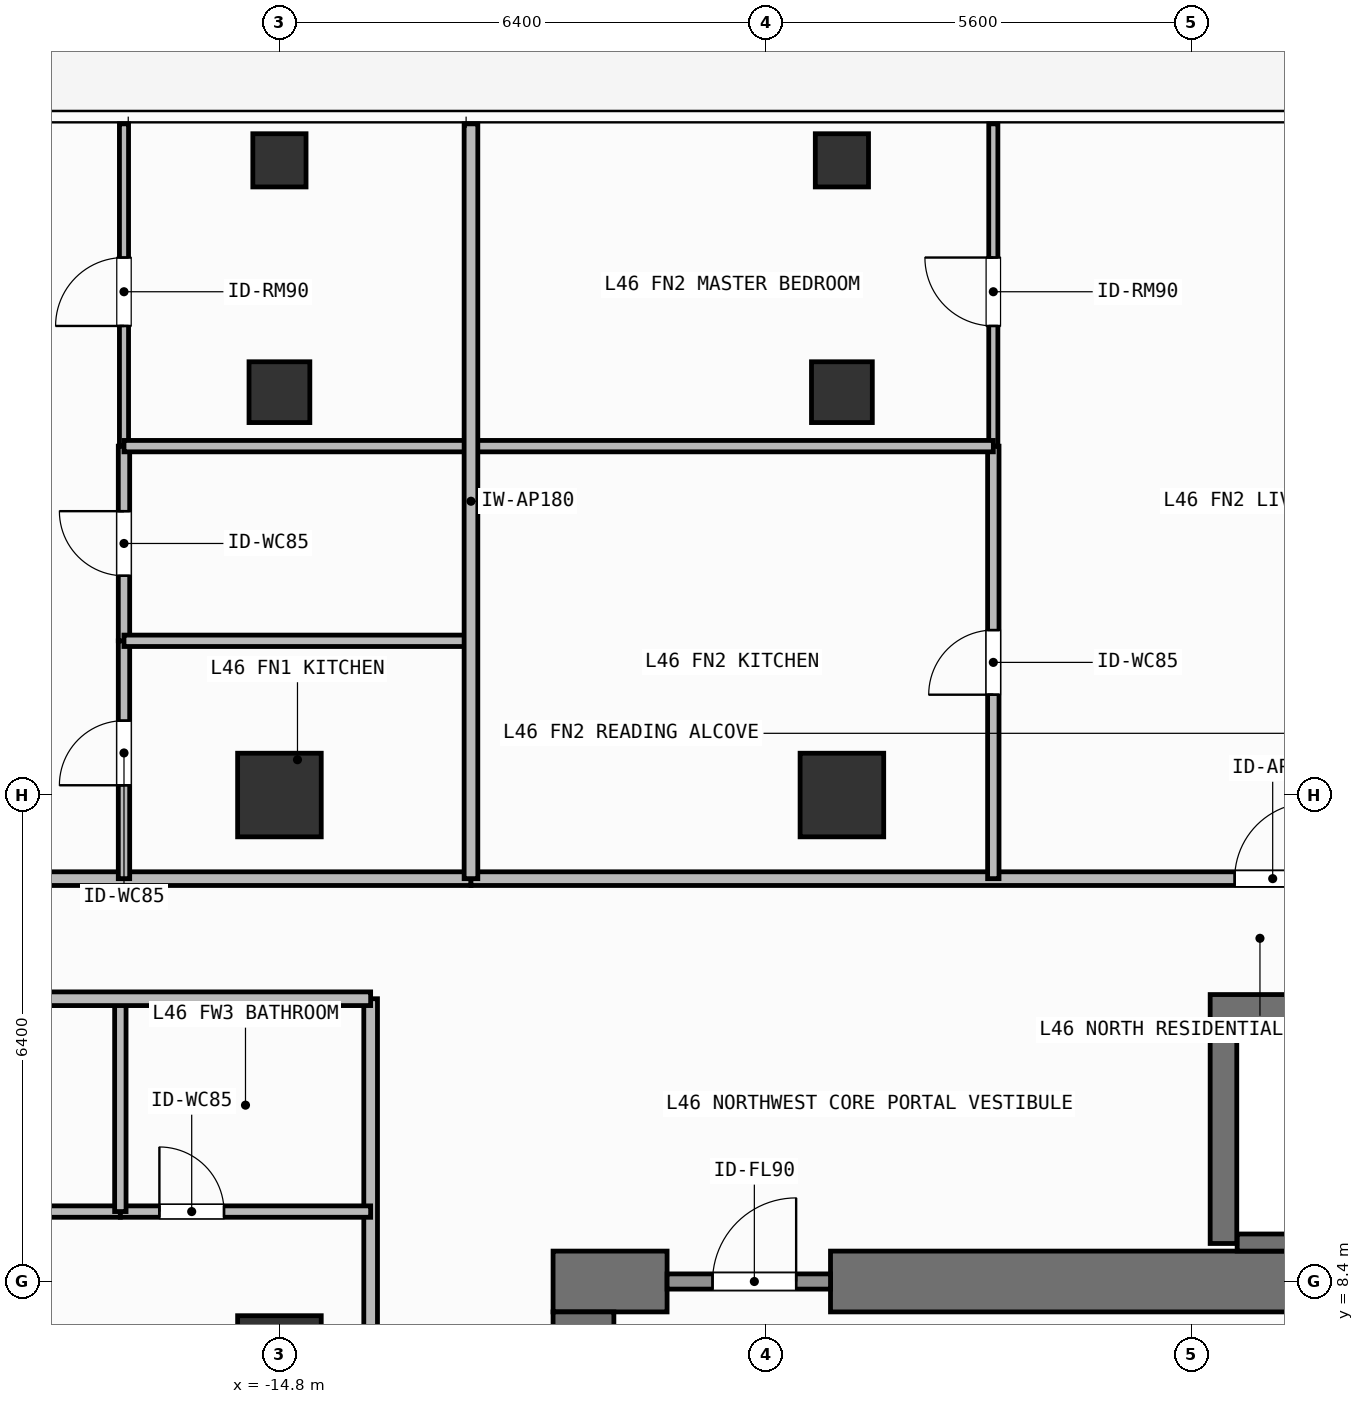
"""IFC4 building model, lengths in metres.
Left out: names, types, materials, properties, quantities, classifications, styles, units other than length and angle.
Written with IfcOpenShell. Run it as: python <this file> out.ifc"""

import sys

from ifc_helpers import new_model, si_unit, direction, frame, frame_2d, origin, origin_2d, place, context, subcontext, project, spatial, rectangle, hollow_rectangle, extrude, element, fill, save


model = new_model("IFC4")
c1 = context("Model", 3, precision=1e-05, world=origin(), true_north=direction((0.0, 1.0)))
c2 = subcontext(c1, "Body", "Model", "MODEL_VIEW")
j1 = project(units=[si_unit("LENGTHUNIT", "METRE"), si_unit("PLANEANGLEUNIT", "RADIAN")], contexts=[c1])
p1 = place(None, origin())
s1 = spatial("IfcSite", under=j1, at=p1, CompositionType="ELEMENT")
p2 = place(p1, origin())
s2 = spatial("IfcBuilding", under=s1, at=p2, CompositionType="ELEMENT")
p3 = place(p2, frame((0.0, 0.0, 187.5)))
s3 = spatial("IfcBuildingStorey", under=s2, at=p3, CompositionType="ELEMENT", Elevation=187.5)
p4 = place(p3, frame((-11.2, 8.4, 0.0), z_axis=(0.0, 0.0, 1.0), x_axis=(1.0, 0.0, 0.0)))
e1 = element("IfcWall", 1, at=p4, inside=s3, PredefinedType="SHEAR", context=c2, shape_type="SweptSolid", body=[
    extrude(rectangle(XDim=1.5, YDim=0.8, at=frame_2d((0.75, 0.0))), origin(), (0.0, 0.0, 1.0), 3.9),
])
p5 = place(p3, frame((-7.55, 8.4, 0.0), z_axis=(0.0, 0.0, 1.0), x_axis=(1.0, 0.0, 0.0)))
e2 = element("IfcWall", 2, at=p5, inside=s3, PredefinedType="SHEAR", context=c2, shape_type="SweptSolid", body=[
    extrude(rectangle(XDim=16.35, YDim=0.8, at=frame_2d((8.175, 0.0))), origin(), (0.0, 0.0, 1.0), 3.9),
])
p6 = place(p3, frame((-10.8, -8.0, 0.0), z_axis=(0.0, 0.0, 1.0), x_axis=(0.0, 1.0, 0.0)))
e3 = element("IfcWall", 3, at=p6, inside=s3, PredefinedType="SHEAR", context=c2, shape_type="SweptSolid", body=[
    extrude(rectangle(XDim=16.0, YDim=0.8, at=frame_2d((8.0, 0.0))), origin(), (0.0, 0.0, 1.0), 3.9),
])
p7 = place(p3, frame((-2.555, 12.0, 0.0), z_axis=(0.0, 0.0, 1.0), x_axis=(1.0, 0.0, 0.0)))
e4 = element("IfcWall", 4, at=p7, inside=s3, PredefinedType="SHEAR", context=c2, shape_type="SweptSolid", body=[
    extrude(rectangle(XDim=7.31, YDim=0.35, at=frame_2d((3.655, 0.0))), origin(), (0.0, 0.0, 1.0), 3.9),
])
p8 = place(p3, frame((-2.2, 8.913, 0.0), z_axis=(0.0, 0.0, 1.0), x_axis=(1.0, 0.0, 0.0)))
e5 = element("IfcWall", 5, at=p8, inside=s3, PredefinedType="SHEAR", context=c2, shape_type="SweptSolid", body=[
    extrude(rectangle(XDim=6.6, YDim=0.225, at=frame_2d((3.3, 0.0))), origin(), (0.0, 0.0, 1.0), 3.9),
])
p9 = place(p3, frame((-2.38, 8.9, 0.0), z_axis=(0.0, 0.0, 1.0), x_axis=(0.0, 1.0, 0.0)))
e6 = element("IfcWall", 6, at=p9, inside=s3, PredefinedType="SHEAR", context=c2, shape_type="SweptSolid", body=[
    extrude(rectangle(XDim=2.925, YDim=0.35, at=frame_2d((1.462, 0.0))), origin(), (0.0, 0.0, 1.0), 3.9),
])
for number, where, z_axis, x_axis in (
    (7, (-14.8, 14.8, 0.0), (0.0, 0.0, 1.0), (1.0, 0.0, 0.0)),
    (8, (-7.4, 14.8, 0.0), (0.0, 0.0, 1.0), (1.0, 0.0, 0.0)),
    (9, (-14.8, 7.4, 0.0), (0.0, 0.0, 1.0), (1.0, 0.0, 0.0)),
):
    element("IfcColumn", number, at=place(p3, frame(where, z_axis=z_axis, x_axis=x_axis)), inside=s3, PredefinedType="COLUMN", context=c2, shape_type="SweptSolid", body=[
        extrude(rectangle(XDim=1.1, YDim=1.1, at=origin_2d()), origin(), (0.0, 0.0, 1.0), 3.9),
    ])
for number, where, z_axis, x_axis in (
    (10, (-14.8, 20.1, 0.0), (0.0, 0.0, 1.0), (1.0, 0.0, 0.0)),
    (11, (-7.4, 20.1, 0.0), (0.0, 0.0, 1.0), (1.0, 0.0, 0.0)),
):
    element("IfcColumn", number, at=place(p3, frame(where, z_axis=z_axis, x_axis=x_axis)), inside=s3, PredefinedType="COLUMN", context=c2, shape_type="SweptSolid", body=[
        extrude(hollow_rectangle(XDim=0.8, YDim=0.8, WallThickness=0.036, at=origin_2d()), origin(), (0.0, 0.0, 1.0), 3.9),
    ])
for number, where, z_axis, x_axis in (
    (12, (-14.8, 23.15, 0.0), (0.0, 0.0, 1.0), (1.0, 0.0, 0.0)),
    (13, (-7.4, 23.15, 0.0), (0.0, 0.0, 1.0), (1.0, 0.0, 0.0)),
):
    element("IfcColumn", number, at=place(p3, frame(where, z_axis=z_axis, x_axis=x_axis)), inside=s3, PredefinedType="COLUMN", context=c2, shape_type="SweptSolid", body=[
        extrude(hollow_rectangle(XDim=0.7, YDim=0.7, WallThickness=0.032, at=origin_2d()), origin(), (0.0, 0.0, 1.0), 3.9),
    ])
p10 = place(p3, frame((-9.7, 8.4, 0.0), z_axis=(0.0, 0.0, 1.0), x_axis=(1.0, 0.0, 0.0)))
e14 = element("IfcWall", 14, at=p10, inside=s3, PredefinedType="SOLIDWALL", context=c2, shape_type="SweptSolid", body=[
    extrude(rectangle(XDim=2.15, YDim=0.2, at=frame_2d((1.075, 0.0))), origin(), (0.0, 0.0, 1.0), 2.76),
])
p11 = place(p10, frame((0.598, 0.0, 0.0)))
e15 = element("IfcOpeningElement", 15, at=p11, cuts=e14, PredefinedType="OPENING", context=c2, shape_type="SweptSolid", body=[
    extrude(rectangle(XDim=1.1, YDim=2.15, at=frame_2d((0.55, 1.075))), frame((0.0, 0.11, 0.0), z_axis=(0.0, -1.0, 0.0), x_axis=(1.0, 0.0, 0.0)), (0.0, 0.0, 1.0), 0.22),
])
p12 = place(p3, frame((-22.12, 13.7, 0.0), z_axis=(0.0, 0.0, 1.0), x_axis=(1.0, 0.0, 0.0)))
e16 = element("IfcWall", 16, at=p12, inside=s3, PredefinedType="PARTITIONING", context=c2, shape_type="SweptSolid", body=[
    extrude(rectangle(XDim=9.84, YDim=0.18, at=frame_2d((4.92, 0.0))), origin(), (0.0, 0.0, 1.0), 3.62),
])
p13 = place(p12, frame((1.758, 0.0, 0.0)))
e17 = element("IfcOpeningElement", 17, at=p13, cuts=e16, PredefinedType="OPENING", context=c2, shape_type="SweptSolid", body=[
    extrude(rectangle(XDim=1.0, YDim=2.2, at=frame_2d((0.5, 1.1))), frame((0.0, 0.1, 0.0), z_axis=(0.0, -1.0, 0.0), x_axis=(1.0, 0.0, 0.0)), (0.0, 0.0, 1.0), 0.2),
])
p14 = place(p3, frame((-16.845, 13.7, 0.0), z_axis=(0.0, 0.0, 1.0), x_axis=(0.0, 1.0, 0.0)))
e18 = element("IfcWall", 18, at=p14, inside=s3, PredefinedType="PARTITIONING", context=c2, shape_type="SweptSolid", body=[
    extrude(rectangle(XDim=3.129, YDim=0.15, at=frame_2d((1.564, 0.0))), origin(), (0.0, 0.0, 1.0), 3.62),
])
p15 = place(p14, frame((1.229, 0.0, 0.0)))
e19 = element("IfcOpeningElement", 19, at=p15, cuts=e18, PredefinedType="OPENING", context=c2, shape_type="SweptSolid", body=[
    extrude(rectangle(XDim=0.85, YDim=2.1, at=frame_2d((0.425, 1.05))), frame((0.0, 0.085, 0.0), z_axis=(0.0, -1.0, 0.0), x_axis=(1.0, 0.0, 0.0)), (0.0, 0.0, 1.0), 0.17),
])
p16 = place(p3, frame((-16.845, 16.829, 0.0), z_axis=(0.0, 0.0, 1.0), x_axis=(0.0, 1.0, 0.0)))
e20 = element("IfcWall", 20, at=p16, inside=s3, PredefinedType="PARTITIONING", context=c2, shape_type="SweptSolid", body=[
    extrude(rectangle(XDim=2.561, YDim=0.15, at=frame_2d((1.28, 0.0))), origin(), (0.0, 0.0, 1.0), 3.62),
])
p17 = place(p16, frame((0.855, 0.0, 0.0)))
e21 = element("IfcOpeningElement", 21, at=p17, cuts=e20, PredefinedType="OPENING", context=c2, shape_type="SweptSolid", body=[
    extrude(rectangle(XDim=0.85, YDim=2.1, at=frame_2d((0.425, 1.05))), frame((0.0, 0.085, 0.0), z_axis=(0.0, -1.0, 0.0), x_axis=(1.0, 0.0, 0.0)), (0.0, 0.0, 1.0), 0.17),
])
p18 = place(p3, frame((-16.845, 19.39, 0.0), z_axis=(0.0, 0.0, 1.0), x_axis=(0.0, 1.0, 0.0)))
e22 = element("IfcWall", 22, at=p18, inside=s3, PredefinedType="PARTITIONING", context=c2, shape_type="SweptSolid", body=[
    extrude(rectangle(XDim=4.24, YDim=0.12, at=frame_2d((2.12, 0.0))), origin(), (0.0, 0.0, 1.0), 3.62),
])
p19 = place(p18, frame((1.581, 0.0, 0.0)))
e23 = element("IfcOpeningElement", 23, at=p19, cuts=e22, PredefinedType="OPENING", context=c2, shape_type="SweptSolid", body=[
    extrude(rectangle(XDim=0.9, YDim=2.1, at=frame_2d((0.45, 1.05))), frame((0.0, 0.07, 0.0), z_axis=(0.0, -1.0, 0.0), x_axis=(1.0, 0.0, 0.0)), (0.0, 0.0, 1.0), 0.14),
])
p20 = place(p3, frame((-12.28, 13.7, 0.0), z_axis=(0.0, 0.0, 1.0), x_axis=(1.0, 0.0, 0.0)))
e24 = element("IfcWall", 24, at=p20, inside=s3, PredefinedType="PARTITIONING", context=c2, shape_type="SweptSolid", body=[
    extrude(rectangle(XDim=18.758, YDim=0.18, at=frame_2d((9.379, 0.0))), origin(), (0.0, 0.0, 1.0), 3.62),
])
p21 = place(p20, frame((10.048, 0.0, 0.0)))
e25 = element("IfcOpeningElement", 25, at=p21, cuts=e24, PredefinedType="OPENING", context=c2, shape_type="SweptSolid", body=[
    extrude(rectangle(XDim=1.0, YDim=2.2, at=frame_2d((0.5, 1.1))), frame((0.0, 0.1, 0.0), z_axis=(0.0, -1.0, 0.0), x_axis=(1.0, 0.0, 0.0)), (0.0, 0.0, 1.0), 0.2),
])
p22 = place(p3, frame((-5.408, 13.7, 0.0), z_axis=(0.0, 0.0, 1.0), x_axis=(0.0, 1.0, 0.0)))
e26 = element("IfcWall", 26, at=p22, inside=s3, PredefinedType="PARTITIONING", context=c2, shape_type="SweptSolid", body=[
    extrude(rectangle(XDim=5.69, YDim=0.15, at=frame_2d((2.845, 0.0))), origin(), (0.0, 0.0, 1.0), 3.62),
])
p23 = place(p22, frame((2.42, 0.0, 0.0)))
e27 = element("IfcOpeningElement", 27, at=p23, cuts=e26, PredefinedType="OPENING", context=c2, shape_type="SweptSolid", body=[
    extrude(rectangle(XDim=0.85, YDim=2.1, at=frame_2d((0.425, 1.05))), frame((0.0, 0.085, 0.0), z_axis=(0.0, -1.0, 0.0), x_axis=(1.0, 0.0, 0.0)), (0.0, 0.0, 1.0), 0.17),
])
p24 = place(p3, frame((-5.408, 19.39, 0.0), z_axis=(0.0, 0.0, 1.0), x_axis=(0.0, 1.0, 0.0)))
e28 = element("IfcWall", 28, at=p24, inside=s3, PredefinedType="PARTITIONING", context=c2, shape_type="SweptSolid", body=[
    extrude(rectangle(XDim=4.24, YDim=0.12, at=frame_2d((2.12, 0.0))), origin(), (0.0, 0.0, 1.0), 3.62),
])
p25 = place(p24, frame((1.581, 0.0, 0.0)))
e29 = element("IfcOpeningElement", 29, at=p25, cuts=e28, PredefinedType="OPENING", context=c2, shape_type="SweptSolid", body=[
    extrude(rectangle(XDim=0.9, YDim=2.1, at=frame_2d((0.45, 1.05))), frame((0.0, 0.07, 0.0), z_axis=(0.0, -1.0, 0.0), x_axis=(1.0, 0.0, 0.0)), (0.0, 0.0, 1.0), 0.14),
])
p26 = place(p3, frame((-13.6, 4.04, 0.0), z_axis=(0.0, 0.0, 1.0), x_axis=(0.0, 1.0, 0.0)))
e30 = element("IfcWall", 30, at=p26, inside=s3, PredefinedType="PARTITIONING", context=c2, shape_type="SweptSolid", body=[
    extrude(rectangle(XDim=8.08, YDim=0.18, at=frame_2d((4.04, 0.0))), origin(), (0.0, 0.0, 1.0), 3.62),
])
p27 = place(p26, frame((1.761, 0.0, 0.0)))
e31 = element("IfcOpeningElement", 31, at=p27, cuts=e30, PredefinedType="OPENING", context=c2, shape_type="SweptSolid", body=[
    extrude(rectangle(XDim=1.0, YDim=2.2, at=frame_2d((0.5, 1.1))), frame((0.0, 0.1, 0.0), z_axis=(0.0, -1.0, 0.0), x_axis=(1.0, 0.0, 0.0)), (0.0, 0.0, 1.0), 0.2),
])
p28 = place(p3, frame((-21.29, 9.32, 0.0), z_axis=(0.0, 0.0, 1.0), x_axis=(1.0, 0.0, 0.0)))
e32 = element("IfcWall", 32, at=p28, inside=s3, PredefinedType="PARTITIONING", context=c2, shape_type="SweptSolid", body=[
    extrude(rectangle(XDim=4.397, YDim=0.15, at=frame_2d((2.198, 0.0))), origin(), (0.0, 0.0, 1.0), 3.62),
])
p29 = place(p28, frame((1.773, 0.0, 0.0)))
e33 = element("IfcOpeningElement", 33, at=p29, cuts=e32, PredefinedType="OPENING", context=c2, shape_type="SweptSolid", body=[
    extrude(rectangle(XDim=0.85, YDim=2.1, at=frame_2d((0.425, 1.05))), frame((0.0, 0.085, 0.0), z_axis=(0.0, -1.0, 0.0), x_axis=(1.0, 0.0, 0.0)), (0.0, 0.0, 1.0), 0.17),
])
p30 = place(p3, frame((-16.893, 9.32, 0.0), z_axis=(0.0, 0.0, 1.0), x_axis=(1.0, 0.0, 0.0)))
e34 = element("IfcWall", 34, at=p30, inside=s3, PredefinedType="PARTITIONING", context=c2, shape_type="SweptSolid", body=[
    extrude(rectangle(XDim=3.293, YDim=0.15, at=frame_2d((1.646, 0.0))), origin(), (0.0, 0.0, 1.0), 3.62),
])
p31 = place(p30, frame((0.514, 0.0, 0.0)))
e35 = element("IfcOpeningElement", 35, at=p31, cuts=e34, PredefinedType="OPENING", context=c2, shape_type="SweptSolid", body=[
    extrude(rectangle(XDim=0.85, YDim=2.1, at=frame_2d((0.425, 1.05))), frame((0.0, 0.085, 0.0), z_axis=(0.0, -1.0, 0.0), x_axis=(1.0, 0.0, 0.0)), (0.0, 0.0, 1.0), 0.17),
])
for number, where, z_axis, x_axis in (
    (36, (-16.845, 16.829, 0.0), (0.0, 0.0, 1.0), (1.0, 0.0, 0.0)),
    (37, (-16.845, 19.39, 0.0), (0.0, 0.0, 1.0), (1.0, 0.0, 0.0)),
):
    element("IfcWall", number, at=place(p3, frame(where, z_axis=z_axis, x_axis=x_axis)), inside=s3, PredefinedType="PARTITIONING", context=c2, shape_type="SweptSolid", body=[
        extrude(rectangle(XDim=4.565, YDim=0.15, at=frame_2d((2.282, 0.0))), origin(), (0.0, 0.0, 1.0), 3.62),
    ])
p32 = place(p3, frame((-12.28, 19.39, 0.0), z_axis=(0.0, 0.0, 1.0), x_axis=(1.0, 0.0, 0.0)))
e38 = element("IfcWall", 38, at=p32, inside=s3, PredefinedType="PARTITIONING", context=c2, shape_type="SweptSolid", body=[
    extrude(rectangle(XDim=6.872, YDim=0.15, at=frame_2d((3.436, 0.0))), origin(), (0.0, 0.0, 1.0), 3.62),
])
p33 = place(p3, frame((-12.28, 13.7, 0.0), z_axis=(0.0, 0.0, 1.0), x_axis=(0.0, 1.0, 0.0)))
e39 = element("IfcWall", 39, at=p33, inside=s3, PredefinedType="PARTITIONING", context=c2, shape_type="SweptSolid", body=[
    extrude(rectangle(XDim=9.93, YDim=0.18, at=frame_2d((4.965, 0.0))), origin(), (0.0, 0.0, 1.0), 3.62),
])
p34 = place(p3, frame((-16.893, 9.32, 0.0), z_axis=(0.0, 0.0, 1.0), x_axis=(0.0, 1.0, 0.0)))
e40 = element("IfcWall", 40, at=p34, inside=s3, PredefinedType="PARTITIONING", context=c2, shape_type="SweptSolid", body=[
    extrude(rectangle(XDim=2.8, YDim=0.15, at=frame_2d((1.4, 0.0))), origin(), (0.0, 0.0, 1.0), 3.62),
])
p35 = place(p3, frame((-25.53, 12.12, 0.0), z_axis=(0.0, 0.0, 1.0), x_axis=(1.0, 0.0, 0.0)))
e41 = element("IfcWall", 41, at=p35, inside=s3, PredefinedType="PARTITIONING", context=c2, shape_type="SweptSolid", body=[
    extrude(rectangle(XDim=11.93, YDim=0.18, at=frame_2d((5.965, 0.0))), origin(), (0.0, 0.0, 1.0), 3.62),
])
p36 = place(p11, origin())
e42 = element("IfcDoor", 42, at=p36, inside=s3, OperationType="SINGLE_SWING_RIGHT", PredefinedType="DOOR", context=c2, shape_type="SweptSolid", body=[
    extrude(rectangle(XDim=1.1, YDim=2.15, at=frame_2d((0.55, 1.075))), frame((0.0, 0.025, 0.0), z_axis=(0.0, -1.0, 0.0), x_axis=(1.0, 0.0, 0.0)), (0.0, 0.0, 1.0), 0.05),
])
fill(e15, e42)
p37 = place(p15, origin())
e43 = element("IfcDoor", 43, at=p37, inside=s3, OperationType="SINGLE_SWING_LEFT", PredefinedType="DOOR", context=c2, shape_type="SweptSolid", body=[
    extrude(rectangle(XDim=0.85, YDim=2.1, at=frame_2d((0.425, 1.05))), frame((0.0, 0.025, 0.0), z_axis=(0.0, -1.0, 0.0), x_axis=(1.0, 0.0, 0.0)), (0.0, 0.0, 1.0), 0.05),
])
fill(e19, e43)
p38 = place(p17, origin())
e44 = element("IfcDoor", 44, at=p38, inside=s3, OperationType="SINGLE_SWING_RIGHT", PredefinedType="DOOR", context=c2, shape_type="SweptSolid", body=[
    extrude(rectangle(XDim=0.85, YDim=2.1, at=frame_2d((0.425, 1.05))), frame((0.0, 0.025, 0.0), z_axis=(0.0, -1.0, 0.0), x_axis=(1.0, 0.0, 0.0)), (0.0, 0.0, 1.0), 0.05),
])
fill(e21, e44)
p39 = place(p19, origin())
e45 = element("IfcDoor", 45, at=p39, inside=s3, OperationType="SINGLE_SWING_LEFT", PredefinedType="DOOR", context=c2, shape_type="SweptSolid", body=[
    extrude(rectangle(XDim=0.9, YDim=2.1, at=frame_2d((0.45, 1.05))), frame((0.0, 0.025, 0.0), z_axis=(0.0, -1.0, 0.0), x_axis=(1.0, 0.0, 0.0)), (0.0, 0.0, 1.0), 0.05),
])
fill(e23, e45)
p40 = place(p21, origin())
e46 = element("IfcDoor", 46, at=p40, inside=s3, OperationType="SINGLE_SWING_RIGHT", PredefinedType="DOOR", context=c2, shape_type="SweptSolid", body=[
    extrude(rectangle(XDim=1.0, YDim=2.2, at=frame_2d((0.5, 1.1))), frame((0.0, 0.025, 0.0), z_axis=(0.0, -1.0, 0.0), x_axis=(1.0, 0.0, 0.0)), (0.0, 0.0, 1.0), 0.05),
])
fill(e25, e46)
p41 = place(p23, origin())
e47 = element("IfcDoor", 47, at=p41, inside=s3, OperationType="SINGLE_SWING_LEFT", PredefinedType="DOOR", context=c2, shape_type="SweptSolid", body=[
    extrude(rectangle(XDim=0.85, YDim=2.1, at=frame_2d((0.425, 1.05))), frame((0.0, 0.025, 0.0), z_axis=(0.0, -1.0, 0.0), x_axis=(1.0, 0.0, 0.0)), (0.0, 0.0, 1.0), 0.05),
])
fill(e27, e47)
p42 = place(p25, origin())
e48 = element("IfcDoor", 48, at=p42, inside=s3, OperationType="SINGLE_SWING_RIGHT", PredefinedType="DOOR", context=c2, shape_type="SweptSolid", body=[
    extrude(rectangle(XDim=0.9, YDim=2.1, at=frame_2d((0.45, 1.05))), frame((0.0, 0.025, 0.0), z_axis=(0.0, -1.0, 0.0), x_axis=(1.0, 0.0, 0.0)), (0.0, 0.0, 1.0), 0.05),
])
fill(e29, e48)
p43 = place(p31, origin())
e49 = element("IfcDoor", 49, at=p43, inside=s3, OperationType="SINGLE_SWING_LEFT", PredefinedType="DOOR", context=c2, shape_type="SweptSolid", body=[
    extrude(rectangle(XDim=0.85, YDim=2.1, at=frame_2d((0.425, 1.05))), frame((0.0, 0.025, 0.0), z_axis=(0.0, -1.0, 0.0), x_axis=(1.0, 0.0, 0.0)), (0.0, 0.0, 1.0), 0.05),
])
fill(e35, e49)
save(model, sys.argv[1])
